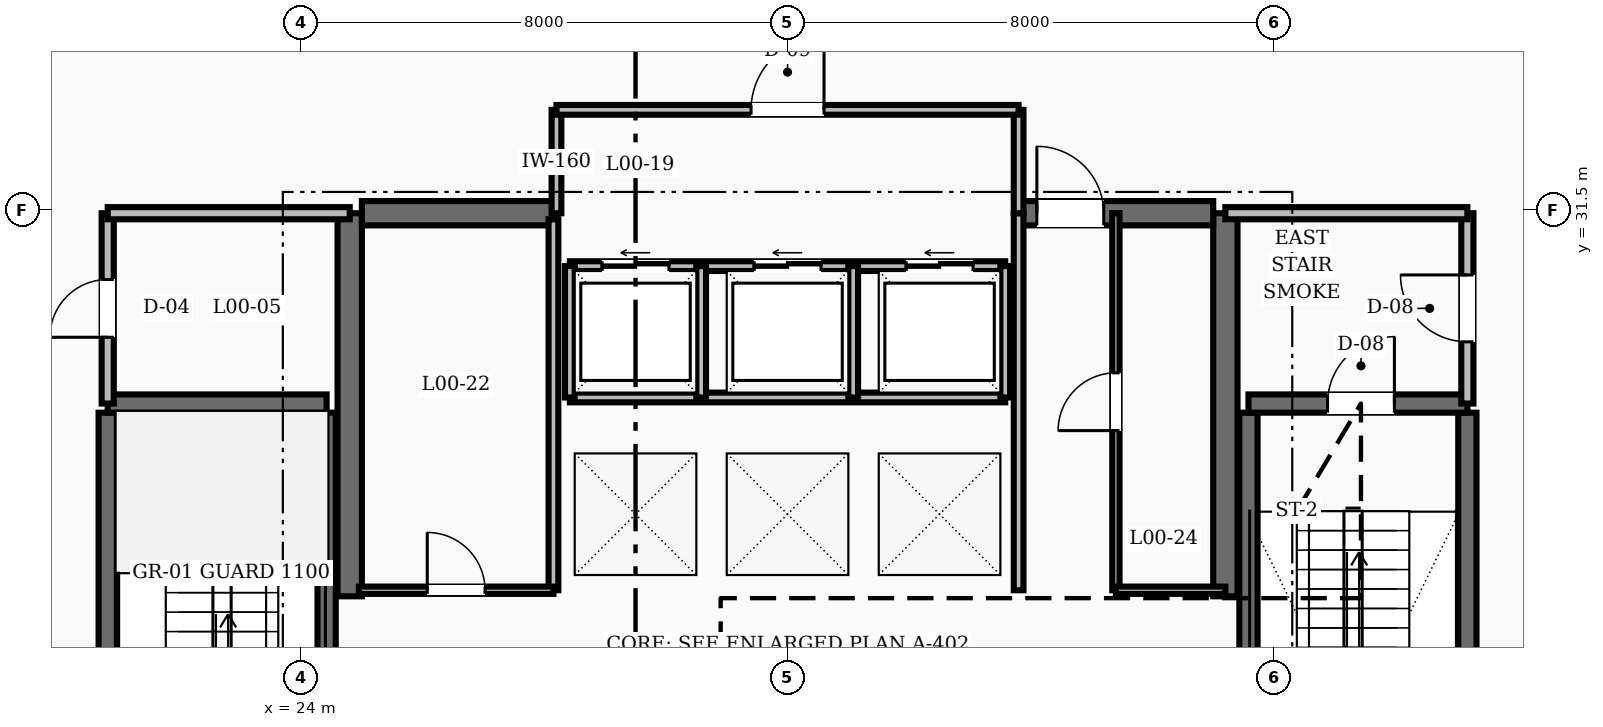
"""IFC4 building model, lengths in metres.
Left out: names, types, materials, properties, quantities, classifications, styles, units other than length and angle.
Written with IfcOpenShell. Run it as: python <this file> out.ifc"""

import sys

from ifc_helpers import new_model, si_unit, direction, frame, frame_2d, origin, place, context, subcontext, project, spatial, rectangle, extrude, element, fill, save


model = new_model("IFC4")
c1 = context("Model", 3, precision=1e-05, world=origin(), true_north=direction((0.0, 1.0)))
c2 = subcontext(c1, "Body", "Model", "MODEL_VIEW")
j1 = project(units=[si_unit("LENGTHUNIT", "METRE"), si_unit("PLANEANGLEUNIT", "RADIAN")], contexts=[c1])
p1 = place(None, origin())
s1 = spatial("IfcSite", under=j1, at=p1, CompositionType="ELEMENT")
p2 = place(p1, origin())
s2 = spatial("IfcBuilding", under=s1, at=p2, CompositionType="ELEMENT")
p3 = place(p2, origin())
s3 = spatial("IfcBuildingStorey", under=s2, at=p3, CompositionType="ELEMENT", Elevation=0.0)
for number, where, z_axis, x_axis in (
    (1, (24.8, 25.15, 0.0), (0.0, 0.0, 1.0), (0.0, 1.0, 0.0)),
    (2, (39.2, 25.15, 0.0), (0.0, 0.0, 1.0), (0.0, 1.0, 0.0)),
):
    element("IfcWall", number, at=place(p3, frame(where, z_axis=z_axis, x_axis=x_axis)), inside=s3, PredefinedType="SHEAR", context=c2, shape_type="SweptSolid", body=[
        extrude(rectangle(XDim=6.3, YDim=0.4, at=frame_2d((3.15, 0.0))), origin(), (0.0, 0.0, 1.0), 5.2),
    ])
p4 = place(p3, frame((25.0, 31.45, 0.0), z_axis=(0.0, 0.0, 1.0), x_axis=(1.0, 0.0, 0.0)))
e3 = element("IfcWall", 3, at=p4, inside=s3, PredefinedType="SHEAR", context=c2, shape_type="SweptSolid", body=[
    extrude(rectangle(XDim=3.2, YDim=0.4, at=frame_2d((1.6, 0.0))), origin(), (0.0, 0.0, 1.0), 5.2),
])
p5 = place(p3, frame((35.8, 31.45, 0.0), z_axis=(0.0, 0.0, 1.0), x_axis=(1.0, 0.0, 0.0)))
e4 = element("IfcWall", 4, at=p5, inside=s3, PredefinedType="SHEAR", context=c2, shape_type="SweptSolid", body=[
    extrude(rectangle(XDim=3.2, YDim=0.4, at=frame_2d((1.6, 0.0))), origin(), (0.0, 0.0, 1.0), 5.2),
])
p6 = place(p5, frame((0.3, 0.0, 0.0)))
e5 = element("IfcOpeningElement", 5, at=p6, cuts=e4, PredefinedType="OPENING", context=c2, shape_type="SweptSolid", body=[
    extrude(rectangle(XDim=1.1, YDim=2.1, at=frame_2d((0.55, 1.05))), frame((0.0, 0.21, 0.0), z_axis=(0.0, -1.0, 0.0), x_axis=(1.0, 0.0, 0.0)), (0.0, 0.0, 1.0), 0.42),
])
for number, where, z_axis, x_axis in (
    (6, (20.82, 19.43, 0.0), (0.0, 0.0, 1.0), (0.0, 1.0, 0.0)),
    (7, (24.42, 19.43, 0.0), (0.0, 0.0, 1.0), (0.0, 1.0, 0.0)),
):
    element("IfcWall", number, at=place(p3, frame(where, z_axis=z_axis, x_axis=x_axis)), inside=s3, PredefinedType="SHEAR", context=c2, shape_type="SweptSolid", body=[
        extrude(rectangle(XDim=8.74, YDim=0.3, at=frame_2d((4.37, 0.0))), origin(), (0.0, 0.0, 1.0), 5.2),
    ])
p7 = place(p3, frame((20.82, 28.32, 0.0), z_axis=(0.0, 0.0, 1.0), x_axis=(1.0, 0.0, 0.0)))
e8 = element("IfcWall", 8, at=p7, inside=s3, PredefinedType="SHEAR", context=c2, shape_type="SweptSolid", body=[
    extrude(rectangle(XDim=3.6, YDim=0.3, at=frame_2d((1.8, 0.0))), origin(), (0.0, 0.0, 1.0), 5.2),
])
for number, where, z_axis, x_axis in (
    (9, (43.18, 19.43, 0.0), (0.0, 0.0, 1.0), (0.0, 1.0, 0.0)),
    (10, (39.58, 19.43, 0.0), (0.0, 0.0, 1.0), (0.0, 1.0, 0.0)),
):
    element("IfcWall", number, at=place(p3, frame(where, z_axis=z_axis, x_axis=x_axis)), inside=s3, PredefinedType="SHEAR", context=c2, shape_type="SweptSolid", body=[
        extrude(rectangle(XDim=8.74, YDim=0.3, at=frame_2d((4.37, 0.0))), origin(), (0.0, 0.0, 1.0), 5.2),
    ])
p8 = place(p3, frame((39.58, 28.32, 0.0), z_axis=(0.0, 0.0, 1.0), x_axis=(1.0, 0.0, 0.0)))
e11 = element("IfcWall", 11, at=p8, inside=s3, PredefinedType="SHEAR", context=c2, shape_type="SweptSolid", body=[
    extrude(rectangle(XDim=3.6, YDim=0.3, at=frame_2d((1.8, 0.0))), origin(), (0.0, 0.0, 1.0), 5.2),
])
p9 = place(p8, frame((1.3, 0.0, 0.0)))
e12 = element("IfcOpeningElement", 12, at=p9, cuts=e11, PredefinedType="OPENING", context=c2, shape_type="SweptSolid", body=[
    extrude(rectangle(XDim=1.1, YDim=2.1, at=frame_2d((0.55, 1.05))), frame((0.0, 0.16, 0.0), z_axis=(0.0, -1.0, 0.0), x_axis=(1.0, 0.0, 0.0)), (0.0, 0.0, 1.0), 0.32),
])
p10 = place(p3, frame((43.18, 28.32, 0.0), z_axis=(0.0, 0.0, 1.0), x_axis=(0.0, 1.0, 0.0)))
e13 = element("IfcWall", 13, at=p10, inside=s3, PredefinedType="SOLIDWALL", context=c2, shape_type="SweptSolid", body=[
    extrude(rectangle(XDim=3.13, YDim=0.2, at=frame_2d((1.565, 0.0))), origin(), (0.0, 0.0, 1.0), 3.92),
])
p11 = place(p10, frame((1.015, 0.0, 0.0)))
e14 = element("IfcOpeningElement", 14, at=p11, cuts=e13, PredefinedType="OPENING", context=c2, shape_type="SweptSolid", body=[
    extrude(rectangle(XDim=1.1, YDim=2.1, at=frame_2d((0.55, 1.05))), frame((0.0, 0.11, 0.0), z_axis=(0.0, -1.0, 0.0), x_axis=(1.0, 0.0, 0.0)), (0.0, 0.0, 1.0), 0.22),
])
p12 = place(p3, frame((39.2, 31.45, 0.0), z_axis=(0.0, 0.0, 1.0), x_axis=(1.0, 0.0, 0.0)))
e15 = element("IfcWall", 15, at=p12, inside=s3, PredefinedType="SOLIDWALL", context=c2, shape_type="SweptSolid", body=[
    extrude(rectangle(XDim=3.98, YDim=0.2, at=frame_2d((1.99, 0.0))), origin(), (0.0, 0.0, 1.0), 3.92),
])
p13 = place(p3, frame((20.82, 28.32, 0.0), z_axis=(0.0, 0.0, 1.0), x_axis=(0.0, 1.0, 0.0)))
e16 = element("IfcWall", 16, at=p13, inside=s3, PredefinedType="SOLIDWALL", context=c2, shape_type="SweptSolid", body=[
    extrude(rectangle(XDim=3.13, YDim=0.2, at=frame_2d((1.565, 0.0))), origin(), (0.0, 0.0, 1.0), 3.92),
])
p14 = place(p13, frame((1.09, 0.0, 0.0)))
e17 = element("IfcOpeningElement", 17, at=p14, cuts=e16, PredefinedType="OPENING", context=c2, shape_type="SweptSolid", body=[
    extrude(rectangle(XDim=0.95, YDim=2.1, at=frame_2d((0.475, 1.05))), frame((0.0, 0.11, 0.0), z_axis=(0.0, -1.0, 0.0), x_axis=(1.0, 0.0, 0.0)), (0.0, 0.0, 1.0), 0.22),
])
p15 = place(p3, frame((20.82, 31.45, 0.0), z_axis=(0.0, 0.0, 1.0), x_axis=(1.0, 0.0, 0.0)))
e18 = element("IfcWall", 18, at=p15, inside=s3, PredefinedType="SOLIDWALL", context=c2, shape_type="SweptSolid", body=[
    extrude(rectangle(XDim=3.98, YDim=0.2, at=frame_2d((1.99, 0.0))), origin(), (0.0, 0.0, 1.0), 3.92),
])
p16 = place(p3, frame((35.8, 25.25, 0.0), z_axis=(0.0, 0.0, 1.0), x_axis=(0.0, 1.0, 0.0)))
e19 = element("IfcWall", 19, at=p16, inside=s3, PredefinedType="SOLIDWALL", context=c2, shape_type="SweptSolid", body=[
    extrude(rectangle(XDim=6.2, YDim=0.16, at=frame_2d((3.1, 0.0))), origin(), (0.0, 0.0, 1.0), 3.92),
])
p17 = place(p3, frame((28.42, 30.58, 0.0), z_axis=(0.0, 0.0, 1.0), x_axis=(1.0, 0.0, 0.0)))
e20 = element("IfcWall", 20, at=p17, inside=s3, PredefinedType="SOLIDWALL", context=c2, shape_type="SweptSolid", body=[
    extrude(rectangle(XDim=7.16, YDim=0.16, at=frame_2d((3.58, 0.0))), origin(), (0.0, 0.0, 1.0), 3.92),
])
p18 = place(p17, frame((0.53, 0.0, 0.0)))
e21 = element("IfcOpeningElement", 21, at=p18, cuts=e20, PredefinedType="OPENING", context=c2, shape_type="SweptSolid", body=[
    extrude(rectangle(XDim=1.1, YDim=2.15, at=frame_2d((0.55, 1.075))), frame((0.0, 0.09, 0.0), z_axis=(0.0, -1.0, 0.0), x_axis=(1.0, 0.0, 0.0)), (0.0, 0.0, 1.0), 0.18),
])
p19 = place(p17, frame((3.03, 0.0, 0.0)))
e22 = element("IfcOpeningElement", 22, at=p19, cuts=e20, PredefinedType="OPENING", context=c2, shape_type="SweptSolid", body=[
    extrude(rectangle(XDim=1.1, YDim=2.15, at=frame_2d((0.55, 1.075))), frame((0.0, 0.09, 0.0), z_axis=(0.0, -1.0, 0.0), x_axis=(1.0, 0.0, 0.0)), (0.0, 0.0, 1.0), 0.18),
])
p20 = place(p17, frame((5.53, 0.0, 0.0)))
e23 = element("IfcOpeningElement", 23, at=p20, cuts=e20, PredefinedType="OPENING", context=c2, shape_type="SweptSolid", body=[
    extrude(rectangle(XDim=1.1, YDim=2.15, at=frame_2d((0.55, 1.075))), frame((0.0, 0.09, 0.0), z_axis=(0.0, -1.0, 0.0), x_axis=(1.0, 0.0, 0.0)), (0.0, 0.0, 1.0), 0.18),
])
p21 = place(p3, frame((28.42, 28.42, 0.0), z_axis=(0.0, 0.0, 1.0), x_axis=(1.0, 0.0, 0.0)))
e24 = element("IfcWall", 24, at=p21, inside=s3, PredefinedType="SOLIDWALL", context=c2, shape_type="SweptSolid", body=[
    extrude(rectangle(XDim=7.16, YDim=0.16, at=frame_2d((3.58, 0.0))), origin(), (0.0, 0.0, 1.0), 3.92),
])
for number, where, z_axis, x_axis in (
    (25, (28.42, 28.42, 0.0), (0.0, 0.0, 1.0), (0.0, 1.0, 0.0)),
    (26, (30.58, 28.42, 0.0), (0.0, 0.0, 1.0), (0.0, 1.0, 0.0)),
    (27, (33.08, 28.42, 0.0), (0.0, 0.0, 1.0), (0.0, 1.0, 0.0)),
    (28, (35.58, 28.42, 0.0), (0.0, 0.0, 1.0), (0.0, 1.0, 0.0)),
):
    element("IfcWall", number, at=place(p3, frame(where, z_axis=z_axis, x_axis=x_axis)), inside=s3, PredefinedType="SOLIDWALL", context=c2, shape_type="SweptSolid", body=[
        extrude(rectangle(XDim=2.16, YDim=0.16, at=frame_2d((1.08, 0.0))), origin(), (0.0, 0.0, 1.0), 3.92),
    ])
for number, where, z_axis, x_axis in (
    (29, (28.2, 31.45, 0.0), (0.0, 0.0, 1.0), (0.0, 1.0, 0.0)),
    (30, (35.8, 31.45, 0.0), (0.0, 0.0, 1.0), (0.0, 1.0, 0.0)),
):
    element("IfcWall", number, at=place(p3, frame(where, z_axis=z_axis, x_axis=x_axis)), inside=s3, PredefinedType="SOLIDWALL", context=c2, shape_type="SweptSolid", body=[
        extrude(rectangle(XDim=1.7, YDim=0.16, at=frame_2d((0.85, 0.0))), origin(), (0.0, 0.0, 1.0), 3.92),
    ])
p22 = place(p3, frame((28.2, 33.15, 0.0), z_axis=(0.0, 0.0, 1.0), x_axis=(1.0, 0.0, 0.0)))
e31 = element("IfcWall", 31, at=p22, inside=s3, PredefinedType="SOLIDWALL", context=c2, shape_type="SweptSolid", body=[
    extrude(rectangle(XDim=7.6, YDim=0.16, at=frame_2d((3.8, 0.0))), origin(), (0.0, 0.0, 1.0), 3.92),
])
p23 = place(p22, frame((3.2, 0.0, 0.0)))
e32 = element("IfcOpeningElement", 32, at=p23, cuts=e31, PredefinedType="OPENING", context=c2, shape_type="SweptSolid", body=[
    extrude(rectangle(XDim=1.2, YDim=2.1, at=frame_2d((0.6, 1.05))), frame((0.0, 0.09, 0.0), z_axis=(0.0, -1.0, 0.0), x_axis=(1.0, 0.0, 0.0)), (0.0, 0.0, 1.0), 0.18),
])
p24 = place(p3, frame((28.15, 25.25, 0.0), z_axis=(0.0, 0.0, 1.0), x_axis=(0.0, 1.0, 0.0)))
e33 = element("IfcWall", 33, at=p24, inside=s3, PredefinedType="SOLIDWALL", context=c2, shape_type="SweptSolid", body=[
    extrude(rectangle(XDim=6.1, YDim=0.16, at=frame_2d((3.05, 0.0))), origin(), (0.0, 0.0, 1.0), 3.92),
])
p25 = place(p3, frame((24.95, 25.25, 0.0), z_axis=(0.0, 0.0, 1.0), x_axis=(1.0, 0.0, 0.0)))
e34 = element("IfcWall", 34, at=p25, inside=s3, PredefinedType="PARTITIONING", context=c2, shape_type="SweptSolid", body=[
    extrude(rectangle(XDim=3.2, YDim=0.12, at=frame_2d((1.6, 0.0))), origin(), (0.0, 0.0, 1.0), 3.92),
])
p26 = place(p25, frame((1.125, 0.0, 0.0)))
e35 = element("IfcOpeningElement", 35, at=p26, cuts=e34, PredefinedType="OPENING", context=c2, shape_type="SweptSolid", body=[
    extrude(rectangle(XDim=0.95, YDim=2.1, at=frame_2d((0.475, 1.05))), frame((0.0, 0.07, 0.0), z_axis=(0.0, -1.0, 0.0), x_axis=(1.0, 0.0, 0.0)), (0.0, 0.0, 1.0), 0.14),
])
p27 = place(p3, frame((37.4, 25.25, 0.0), z_axis=(0.0, 0.0, 1.0), x_axis=(0.0, 1.0, 0.0)))
e36 = element("IfcWall", 36, at=p27, inside=s3, PredefinedType="PARTITIONING", context=c2, shape_type="SweptSolid", body=[
    extrude(rectangle(XDim=6.2, YDim=0.12, at=frame_2d((3.1, 0.0))), origin(), (0.0, 0.0, 1.0), 3.92),
])
p28 = place(p27, frame((2.625, 0.0, 0.0)))
e37 = element("IfcOpeningElement", 37, at=p28, cuts=e36, PredefinedType="OPENING", context=c2, shape_type="SweptSolid", body=[
    extrude(rectangle(XDim=0.95, YDim=2.1, at=frame_2d((0.475, 1.05))), frame((0.0, 0.07, 0.0), z_axis=(0.0, -1.0, 0.0), x_axis=(1.0, 0.0, 0.0)), (0.0, 0.0, 1.0), 0.14),
])
p29 = place(p3, frame((37.4, 25.25, 0.0), z_axis=(0.0, 0.0, 1.0), x_axis=(1.0, 0.0, 0.0)))
e38 = element("IfcWall", 38, at=p29, inside=s3, PredefinedType="PARTITIONING", context=c2, shape_type="SweptSolid", body=[
    extrude(rectangle(XDim=1.8, YDim=0.12, at=frame_2d((0.9, 0.0))), origin(), (0.0, 0.0, 1.0), 3.92),
])
p30 = place(p9, origin())
e39 = element("IfcDoor", 39, at=p30, inside=s3, OperationType="SINGLE_SWING_RIGHT", PredefinedType="DOOR", context=c2, shape_type="SweptSolid", body=[
    extrude(rectangle(XDim=1.1, YDim=2.1, at=frame_2d((0.55, 1.05))), frame((0.0, 0.025, 0.0), z_axis=(0.0, -1.0, 0.0), x_axis=(1.0, 0.0, 0.0)), (0.0, 0.0, 1.0), 0.05),
])
fill(e12, e39)
p31 = place(p11, origin())
e40 = element("IfcDoor", 40, at=p31, inside=s3, OperationType="SINGLE_SWING_RIGHT", PredefinedType="DOOR", context=c2, shape_type="SweptSolid", body=[
    extrude(rectangle(XDim=1.1, YDim=2.1, at=frame_2d((0.55, 1.05))), frame((0.0, 0.025, 0.0), z_axis=(0.0, -1.0, 0.0), x_axis=(1.0, 0.0, 0.0)), (0.0, 0.0, 1.0), 0.05),
])
fill(e14, e40)
p32 = place(p14, origin())
e41 = element("IfcDoor", 41, at=p32, inside=s3, OperationType="SINGLE_SWING_LEFT", PredefinedType="DOOR", context=c2, shape_type="SweptSolid", body=[
    extrude(rectangle(XDim=0.95, YDim=2.1, at=frame_2d((0.475, 1.05))), frame((0.0, 0.025, 0.0), z_axis=(0.0, -1.0, 0.0), x_axis=(1.0, 0.0, 0.0)), (0.0, 0.0, 1.0), 0.05),
])
fill(e17, e41)
p33 = place(p6, origin())
e42 = element("IfcDoor", 42, at=p33, inside=s3, OperationType="SINGLE_SWING_LEFT", PredefinedType="DOOR", context=c2, shape_type="SweptSolid", body=[
    extrude(rectangle(XDim=1.1, YDim=2.1, at=frame_2d((0.55, 1.05))), frame((0.0, 0.025, 0.0), z_axis=(0.0, -1.0, 0.0), x_axis=(1.0, 0.0, 0.0)), (0.0, 0.0, 1.0), 0.05),
])
fill(e5, e42)
p34 = place(p18, origin())
e43 = element("IfcDoor", 43, at=p34, inside=s3, OperationType="SLIDING_TO_LEFT", PredefinedType="DOOR", context=c2, shape_type="SweptSolid", body=[
    extrude(rectangle(XDim=1.1, YDim=2.15, at=frame_2d((0.55, 1.075))), frame((0.0, 0.025, 0.0), z_axis=(0.0, -1.0, 0.0), x_axis=(1.0, 0.0, 0.0)), (0.0, 0.0, 1.0), 0.05),
])
fill(e21, e43)
p35 = place(p19, origin())
e44 = element("IfcDoor", 44, at=p35, inside=s3, OperationType="SLIDING_TO_LEFT", PredefinedType="DOOR", context=c2, shape_type="SweptSolid", body=[
    extrude(rectangle(XDim=1.1, YDim=2.15, at=frame_2d((0.55, 1.075))), frame((0.0, 0.025, 0.0), z_axis=(0.0, -1.0, 0.0), x_axis=(1.0, 0.0, 0.0)), (0.0, 0.0, 1.0), 0.05),
])
fill(e22, e44)
p36 = place(p20, origin())
e45 = element("IfcDoor", 45, at=p36, inside=s3, OperationType="SLIDING_TO_LEFT", PredefinedType="DOOR", context=c2, shape_type="SweptSolid", body=[
    extrude(rectangle(XDim=1.1, YDim=2.15, at=frame_2d((0.55, 1.075))), frame((0.0, 0.025, 0.0), z_axis=(0.0, -1.0, 0.0), x_axis=(1.0, 0.0, 0.0)), (0.0, 0.0, 1.0), 0.05),
])
fill(e23, e45)
p37 = place(p23, origin())
e46 = element("IfcDoor", 46, at=p37, inside=s3, OperationType="SINGLE_SWING_RIGHT", PredefinedType="DOOR", context=c2, shape_type="SweptSolid", body=[
    extrude(rectangle(XDim=1.2, YDim=2.1, at=frame_2d((0.6, 1.05))), frame((0.0, 0.025, 0.0), z_axis=(0.0, -1.0, 0.0), x_axis=(1.0, 0.0, 0.0)), (0.0, 0.0, 1.0), 0.05),
])
fill(e32, e46)
p38 = place(p26, origin())
e47 = element("IfcDoor", 47, at=p38, inside=s3, OperationType="SINGLE_SWING_LEFT", PredefinedType="DOOR", context=c2, shape_type="SweptSolid", body=[
    extrude(rectangle(XDim=0.95, YDim=2.1, at=frame_2d((0.475, 1.05))), frame((0.0, 0.025, 0.0), z_axis=(0.0, -1.0, 0.0), x_axis=(1.0, 0.0, 0.0)), (0.0, 0.0, 1.0), 0.05),
])
fill(e35, e47)
p39 = place(p28, origin())
e48 = element("IfcDoor", 48, at=p39, inside=s3, OperationType="SINGLE_SWING_LEFT", PredefinedType="DOOR", context=c2, shape_type="SweptSolid", body=[
    extrude(rectangle(XDim=0.95, YDim=2.1, at=frame_2d((0.475, 1.05))), frame((0.0, 0.025, 0.0), z_axis=(0.0, -1.0, 0.0), x_axis=(1.0, 0.0, 0.0)), (0.0, 0.0, 1.0), 0.05),
])
fill(e37, e48)
save(model, sys.argv[1])
